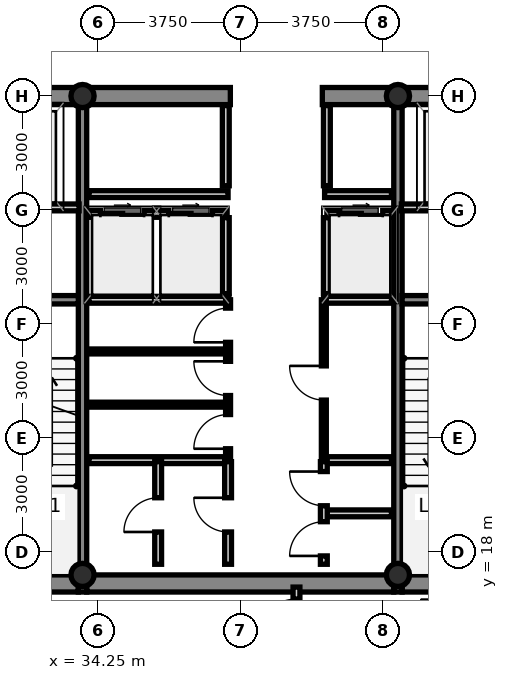
"""IFC4 building model, lengths in metres.
Left out: names, types, materials, properties, quantities, classifications, styles, units other than length and angle.
Written with IfcOpenShell. Run it as: python <this file> out.ifc"""

import sys

from ifc_helpers import new_model, si_unit, direction, frame, frame_2d, origin, origin_2d, place, context, subcontext, project, spatial, rectangle, hollow_circle, extrude, source, transform, mapped, element, fill, save


model = new_model("IFC4")
c1 = context("Model", 3, precision=1e-05, world=origin(), true_north=direction((0.0, 1.0)))
c2 = subcontext(c1, "Body", "Model", "MODEL_VIEW")
j1 = project(units=[si_unit("LENGTHUNIT", "METRE"), si_unit("PLANEANGLEUNIT", "RADIAN")], contexts=[c1])
p1 = place(None, origin())
s1 = spatial("IfcSite", under=j1, at=p1, CompositionType="ELEMENT")
p2 = place(p1, origin())
s2 = spatial("IfcBuilding", under=s1, at=p2, CompositionType="ELEMENT")
p3 = place(p2, frame((0.0, 0.0, 150.05)))
s3 = spatial("IfcBuildingStorey", under=s2, at=p3, CompositionType="ELEMENT", Elevation=150.05)
m1 = source(origin(), c2, "Body", "SweptSolid", [
    extrude(hollow_circle(Radius=0.305, WallThickness=0.025, at=origin_2d()), origin(), (0.0, 0.0, 1.0), 4.8),
])
for number, where, z_axis, x_axis in (
    (1, (33.85, 17.4, 0.0), (0.0, 0.0, 1.0), (1.0, 0.0, 0.0)),
    (2, (42.15, 17.4, 0.0), (0.0, 0.0, 1.0), (1.0, 0.0, 0.0)),
    (3, (33.85, 30.0, 0.0), (0.0, 0.0, 1.0), (1.0, 0.0, 0.0)),
    (4, (42.15, 30.0, 0.0), (0.0, 0.0, 1.0), (1.0, 0.0, 0.0)),
):
    element("IfcColumn", number, at=place(p3, frame(where, z_axis=z_axis, x_axis=x_axis)), inside=s3, PredefinedType="COLUMN", context=c2, shape_type="MappedRepresentation", body=[
        mapped(m1, transform((0.0, 0.0, 0.0), scale=1.0)),
    ])
p4 = place(p3, frame((30.84, 17.175, 0.0), z_axis=(0.0, 0.0, 1.0), x_axis=(1.0, 0.0, 0.0)))
e5 = element("IfcWall", 5, at=p4, inside=s3, PredefinedType="SHEAR", context=c2, shape_type="SweptSolid", body=[
    extrude(rectangle(XDim=2.9, YDim=0.45, at=frame_2d((1.45, 0.0))), origin(), (0.0, 0.0, 1.0), 4.8),
])
p5 = place(p3, frame((33.96, 17.175, 0.0), z_axis=(0.0, 0.0, 1.0), x_axis=(1.0, 0.0, 0.0)))
e6 = element("IfcWall", 6, at=p5, inside=s3, PredefinedType="SHEAR", context=c2, shape_type="SweptSolid", body=[
    extrude(rectangle(XDim=8.08, YDim=0.45, at=frame_2d((4.04, 0.0))), origin(), (0.0, 0.0, 1.0), 4.8),
])
for number, where, z_axis, x_axis in (
    (7, (42.26, 17.175, 0.0), (0.0, 0.0, 1.0), (1.0, 0.0, 0.0)),
    (8, (30.84, 30.0, 0.0), (0.0, 0.0, 1.0), (1.0, 0.0, 0.0)),
):
    element("IfcWall", number, at=place(p3, frame(where, z_axis=z_axis, x_axis=x_axis)), inside=s3, PredefinedType="SHEAR", context=c2, shape_type="SweptSolid", body=[
        extrude(rectangle(XDim=2.9, YDim=0.45, at=frame_2d((1.45, 0.0))), origin(), (0.0, 0.0, 1.0), 4.8),
    ])
p6 = place(p3, frame((33.96, 30.0, 0.0), z_axis=(0.0, 0.0, 1.0), x_axis=(1.0, 0.0, 0.0)))
e9 = element("IfcWall", 9, at=p6, inside=s3, PredefinedType="SHEAR", context=c2, shape_type="SweptSolid", body=[
    extrude(rectangle(XDim=3.78, YDim=0.45, at=frame_2d((1.89, 0.0))), origin(), (0.0, 0.0, 1.0), 4.8),
])
p7 = place(p3, frame((40.16, 30.0, 0.0), z_axis=(0.0, 0.0, 1.0), x_axis=(1.0, 0.0, 0.0)))
e10 = element("IfcWall", 10, at=p7, inside=s3, PredefinedType="SHEAR", context=c2, shape_type="SweptSolid", body=[
    extrude(rectangle(XDim=1.88, YDim=0.45, at=frame_2d((0.94, 0.0))), origin(), (0.0, 0.0, 1.0), 4.8),
])
p8 = place(p3, frame((42.26, 30.0, 0.0), z_axis=(0.0, 0.0, 1.0), x_axis=(1.0, 0.0, 0.0)))
e11 = element("IfcWall", 11, at=p8, inside=s3, PredefinedType="SHEAR", context=c2, shape_type="SweptSolid", body=[
    extrude(rectangle(XDim=2.9, YDim=0.45, at=frame_2d((1.45, 0.0))), origin(), (0.0, 0.0, 1.0), 4.8),
])
for number, where, z_axis, x_axis in (
    (12, (33.85, 16.95, 0.0), (0.0, 0.0, 1.0), (0.0, 1.0, 0.0)),
    (13, (42.15, 16.95, 0.0), (0.0, 0.0, 1.0), (0.0, 1.0, 0.0)),
):
    element("IfcWall", number, at=place(p3, frame(where, z_axis=z_axis, x_axis=x_axis)), inside=s3, PredefinedType="SHEAR", context=c2, shape_type="SweptSolid", body=[
        extrude(rectangle(XDim=13.275, YDim=0.22, at=frame_2d((6.638, 0.0))), origin(), (0.0, 0.0, 1.0), 4.8),
    ])
for number, where, z_axis, x_axis in (
    (14, (30.84, 24.64, 0.0), (0.0, 0.0, 1.0), (1.0, 0.0, 0.0)),
    (15, (42.26, 24.64, 0.0), (0.0, 0.0, 1.0), (1.0, 0.0, 0.0)),
):
    element("IfcWall", number, at=place(p3, frame(where, z_axis=z_axis, x_axis=x_axis)), inside=s3, PredefinedType="SHEAR", context=c2, shape_type="SweptSolid", body=[
        extrude(rectangle(XDim=2.9, YDim=0.22, at=frame_2d((1.45, 0.0))), origin(), (0.0, 0.0, 1.0), 4.8),
    ])
p9 = place(p3, frame((34.02, 26.9, 0.0), z_axis=(0.0, 0.0, 1.0), x_axis=(1.0, 0.0, 0.0)))
e16 = element("IfcWall", 16, at=p9, inside=s3, PredefinedType="PARTITIONING", context=c2, shape_type="SweptSolid", body=[
    extrude(rectangle(XDim=3.6, YDim=0.18, at=frame_2d((1.8, 0.0))), origin(), (0.0, 0.0, 1.0), 4.55),
])
p10 = place(p9, frame((0.3, 0.0, 0.0)))
e17 = element("IfcOpeningElement", 17, at=p10, cuts=e16, PredefinedType="OPENING", context=c2, shape_type="SweptSolid", body=[
    extrude(rectangle(XDim=1.15, YDim=2.2, at=frame_2d((0.575, 1.1))), frame((0.0, 0.102, 0.0), z_axis=(0.0, -1.0, 0.0), x_axis=(1.0, 0.0, 0.0)), (0.0, 0.0, 1.0), 0.204),
])
p11 = place(p9, frame((2.1, 0.0, 0.0)))
e18 = element("IfcOpeningElement", 18, at=p11, cuts=e16, PredefinedType="OPENING", context=c2, shape_type="SweptSolid", body=[
    extrude(rectangle(XDim=1.15, YDim=2.2, at=frame_2d((0.575, 1.1))), frame((0.0, 0.102, 0.0), z_axis=(0.0, -1.0, 0.0), x_axis=(1.0, 0.0, 0.0)), (0.0, 0.0, 1.0), 0.204),
])
p12 = place(p3, frame((40.28, 26.9, 0.0), z_axis=(0.0, 0.0, 1.0), x_axis=(1.0, 0.0, 0.0)))
e19 = element("IfcWall", 19, at=p12, inside=s3, PredefinedType="PARTITIONING", context=c2, shape_type="SweptSolid", body=[
    extrude(rectangle(XDim=1.7, YDim=0.18, at=frame_2d((0.85, 0.0))), origin(), (0.0, 0.0, 1.0), 4.55),
])
p13 = place(p12, frame((0.32, 0.0, 0.0)))
e20 = element("IfcOpeningElement", 20, at=p13, cuts=e19, PredefinedType="OPENING", context=c2, shape_type="SweptSolid", body=[
    extrude(rectangle(XDim=1.15, YDim=2.2, at=frame_2d((0.575, 1.1))), frame((0.0, 0.102, 0.0), z_axis=(0.0, -1.0, 0.0), x_axis=(1.0, 0.0, 0.0)), (0.0, 0.0, 1.0), 0.204),
])
for number, where, z_axis, x_axis in (
    (21, (37.62, 24.8, 0.0), (0.0, 0.0, 1.0), (0.0, 1.0, 0.0)),
    (22, (40.28, 24.8, 0.0), (0.0, 0.0, 1.0), (0.0, 1.0, 0.0)),
):
    element("IfcWall", number, at=place(p3, frame(where, z_axis=z_axis, x_axis=x_axis)), inside=s3, PredefinedType="PARTITIONING", context=c2, shape_type="SweptSolid", body=[
        extrude(rectangle(XDim=2.0, YDim=0.18, at=frame_2d((1.0, 0.0))), origin(), (0.0, 0.0, 1.0), 4.55),
    ])
p14 = place(p3, frame((34.02, 24.64, 0.0), z_axis=(0.0, 0.0, 1.0), x_axis=(1.0, 0.0, 0.0)))
e23 = element("IfcWall", 23, at=p14, inside=s3, PredefinedType="PARTITIONING", context=c2, shape_type="SweptSolid", body=[
    extrude(rectangle(XDim=3.68, YDim=0.18, at=frame_2d((1.84, 0.0))), origin(), (0.0, 0.0, 1.0), 4.55),
])
p15 = place(p3, frame((40.2, 24.64, 0.0), z_axis=(0.0, 0.0, 1.0), x_axis=(1.0, 0.0, 0.0)))
e24 = element("IfcWall", 24, at=p15, inside=s3, PredefinedType="PARTITIONING", context=c2, shape_type="SweptSolid", body=[
    extrude(rectangle(XDim=1.78, YDim=0.18, at=frame_2d((0.89, 0.0))), origin(), (0.0, 0.0, 1.0), 4.55),
])
p16 = place(p3, frame((34.02, 27.42, 0.0), z_axis=(0.0, 0.0, 1.0), x_axis=(1.0, 0.0, 0.0)))
e25 = element("IfcWall", 25, at=p16, inside=s3, PredefinedType="PARTITIONING", context=c2, shape_type="SweptSolid", body=[
    extrude(rectangle(XDim=3.66, YDim=0.18, at=frame_2d((1.83, 0.0))), origin(), (0.0, 0.0, 1.0), 4.55),
])
p17 = place(p3, frame((40.22, 27.42, 0.0), z_axis=(0.0, 0.0, 1.0), x_axis=(1.0, 0.0, 0.0)))
e26 = element("IfcWall", 26, at=p17, inside=s3, PredefinedType="PARTITIONING", context=c2, shape_type="SweptSolid", body=[
    extrude(rectangle(XDim=1.76, YDim=0.18, at=frame_2d((0.88, 0.0))), origin(), (0.0, 0.0, 1.0), 4.55),
])
for number, where, z_axis, x_axis in (
    (27, (37.62, 27.64, 0.0), (0.0, 0.0, 1.0), (0.0, 1.0, 0.0)),
    (28, (40.28, 27.64, 0.0), (0.0, 0.0, 1.0), (0.0, 1.0, 0.0)),
):
    element("IfcWall", number, at=place(p3, frame(where, z_axis=z_axis, x_axis=x_axis)), inside=s3, PredefinedType="PARTITIONING", context=c2, shape_type="SweptSolid", body=[
        extrude(rectangle(XDim=2.11, YDim=0.18, at=frame_2d((1.055, 0.0))), origin(), (0.0, 0.0, 1.0), 4.55),
    ])
for number, where, z_axis, x_axis in (
    (29, (30.86, 27.07, 0.0), (0.0, 0.0, 1.0), (1.0, 0.0, 0.0)),
    (30, (42.24, 27.07, 0.0), (0.0, 0.0, 1.0), (1.0, 0.0, 0.0)),
):
    element("IfcWall", number, at=place(p3, frame(where, z_axis=z_axis, x_axis=x_axis)), inside=s3, PredefinedType="PARTITIONING", context=c2, shape_type="SweptSolid", body=[
        extrude(rectangle(XDim=2.9, YDim=0.18, at=frame_2d((1.45, 0.0))), origin(), (0.0, 0.0, 1.0), 4.55),
    ])
p18 = place(p3, frame((34.02, 20.42, 0.0), z_axis=(0.0, 0.0, 1.0), x_axis=(1.0, 0.0, 0.0)))
e31 = element("IfcWall", 31, at=p18, inside=s3, PredefinedType="PARTITIONING", context=c2, shape_type="SweptSolid", body=[
    extrude(rectangle(XDim=3.64, YDim=0.18, at=frame_2d((1.82, 0.0))), origin(), (0.0, 0.0, 1.0), 4.55),
])
p19 = place(p3, frame((40.22, 20.42, 0.0), z_axis=(0.0, 0.0, 1.0), x_axis=(1.0, 0.0, 0.0)))
e32 = element("IfcWall", 32, at=p19, inside=s3, PredefinedType="PARTITIONING", context=c2, shape_type="SweptSolid", body=[
    extrude(rectangle(XDim=1.76, YDim=0.18, at=frame_2d((0.88, 0.0))), origin(), (0.0, 0.0, 1.0), 4.55),
])
for number, where, z_axis, x_axis in (
    (33, (34.02, 21.88, 0.0), (0.0, 0.0, 1.0), (1.0, 0.0, 0.0)),
    (34, (34.02, 23.28, 0.0), (0.0, 0.0, 1.0), (1.0, 0.0, 0.0)),
):
    element("IfcWall", number, at=place(p3, frame(where, z_axis=z_axis, x_axis=x_axis)), inside=s3, PredefinedType="PARTITIONING", context=c2, shape_type="SweptSolid", body=[
        extrude(rectangle(XDim=3.58, YDim=0.13, at=frame_2d((1.79, 0.0))), origin(), (0.0, 0.0, 1.0), 4.55),
    ])
p20 = place(p3, frame((37.68, 20.5, 0.0), z_axis=(0.0, 0.0, 1.0), x_axis=(0.0, 1.0, 0.0)))
e35 = element("IfcWall", 35, at=p20, inside=s3, PredefinedType="PARTITIONING", context=c2, shape_type="SweptSolid", body=[
    extrude(rectangle(XDim=4.14, YDim=0.13, at=frame_2d((2.07, 0.0))), origin(), (0.0, 0.0, 1.0), 4.55),
])
p21 = place(p20, frame((0.22, 0.0, 0.0)))
e36 = element("IfcOpeningElement", 36, at=p21, cuts=e35, PredefinedType="OPENING", context=c2, shape_type="SweptSolid", body=[
    extrude(rectangle(XDim=0.9, YDim=2.1, at=frame_2d((0.45, 1.05))), frame((0.0, 0.077, 0.0), z_axis=(0.0, -1.0, 0.0), x_axis=(1.0, 0.0, 0.0)), (0.0, 0.0, 1.0), 0.154),
])
p22 = place(p20, frame((1.62, 0.0, 0.0)))
e37 = element("IfcOpeningElement", 37, at=p22, cuts=e35, PredefinedType="OPENING", context=c2, shape_type="SweptSolid", body=[
    extrude(rectangle(XDim=0.9, YDim=2.1, at=frame_2d((0.45, 1.05))), frame((0.0, 0.077, 0.0), z_axis=(0.0, -1.0, 0.0), x_axis=(1.0, 0.0, 0.0)), (0.0, 0.0, 1.0), 0.154),
])
p23 = place(p20, frame((3.02, 0.0, 0.0)))
e38 = element("IfcOpeningElement", 38, at=p23, cuts=e35, PredefinedType="OPENING", context=c2, shape_type="SweptSolid", body=[
    extrude(rectangle(XDim=0.9, YDim=2.1, at=frame_2d((0.45, 1.05))), frame((0.0, 0.077, 0.0), z_axis=(0.0, -1.0, 0.0), x_axis=(1.0, 0.0, 0.0)), (0.0, 0.0, 1.0), 0.154),
])
p24 = place(p3, frame((40.2, 20.5, 0.0), z_axis=(0.0, 0.0, 1.0), x_axis=(0.0, 1.0, 0.0)))
e39 = element("IfcWall", 39, at=p24, inside=s3, PredefinedType="PARTITIONING", context=c2, shape_type="SweptSolid", body=[
    extrude(rectangle(XDim=4.14, YDim=0.13, at=frame_2d((2.07, 0.0))), origin(), (0.0, 0.0, 1.0), 4.55),
])
p25 = place(p24, frame((1.5, 0.0, 0.0)))
e40 = element("IfcOpeningElement", 40, at=p25, cuts=e39, PredefinedType="OPENING", context=c2, shape_type="SweptSolid", body=[
    extrude(rectangle(XDim=0.9, YDim=2.1, at=frame_2d((0.45, 1.05))), frame((0.0, 0.077, 0.0), z_axis=(0.0, -1.0, 0.0), x_axis=(1.0, 0.0, 0.0)), (0.0, 0.0, 1.0), 0.154),
])
p26 = place(p3, frame((35.84, 17.68, 0.0), z_axis=(0.0, 0.0, 1.0), x_axis=(0.0, 1.0, 0.0)))
e41 = element("IfcWall", 41, at=p26, inside=s3, PredefinedType="PARTITIONING", context=c2, shape_type="SweptSolid", body=[
    extrude(rectangle(XDim=2.7, YDim=0.18, at=frame_2d((1.35, 0.0))), origin(), (0.0, 0.0, 1.0), 4.55),
])
p27 = place(p26, frame((0.85, 0.0, 0.0)))
e42 = element("IfcOpeningElement", 42, at=p27, cuts=e41, PredefinedType="OPENING", context=c2, shape_type="SweptSolid", body=[
    extrude(rectangle(XDim=0.9, YDim=2.1, at=frame_2d((0.45, 1.05))), frame((0.0, 0.102, 0.0), z_axis=(0.0, -1.0, 0.0), x_axis=(1.0, 0.0, 0.0)), (0.0, 0.0, 1.0), 0.204),
])
p28 = place(p3, frame((37.68, 17.68, 0.0), z_axis=(0.0, 0.0, 1.0), x_axis=(0.0, 1.0, 0.0)))
e43 = element("IfcWall", 43, at=p28, inside=s3, PredefinedType="PARTITIONING", context=c2, shape_type="SweptSolid", body=[
    extrude(rectangle(XDim=2.7, YDim=0.18, at=frame_2d((1.35, 0.0))), origin(), (0.0, 0.0, 1.0), 4.55),
])
p29 = place(p28, frame((0.85, 0.0, 0.0)))
e44 = element("IfcOpeningElement", 44, at=p29, cuts=e43, PredefinedType="OPENING", context=c2, shape_type="SweptSolid", body=[
    extrude(rectangle(XDim=0.9, YDim=2.1, at=frame_2d((0.45, 1.05))), frame((0.0, 0.102, 0.0), z_axis=(0.0, -1.0, 0.0), x_axis=(1.0, 0.0, 0.0)), (0.0, 0.0, 1.0), 0.204),
])
p30 = place(p3, frame((40.28, 19.02, 0.0), z_axis=(0.0, 0.0, 1.0), x_axis=(1.0, 0.0, 0.0)))
e45 = element("IfcWall", 45, at=p30, inside=s3, PredefinedType="PARTITIONING", context=c2, shape_type="SweptSolid", body=[
    extrude(rectangle(XDim=1.7, YDim=0.18, at=frame_2d((0.85, 0.0))), origin(), (0.0, 0.0, 1.0), 4.55),
])
p31 = place(p3, frame((40.2, 17.68, 0.0), z_axis=(0.0, 0.0, 1.0), x_axis=(0.0, 1.0, 0.0)))
e46 = element("IfcWall", 46, at=p31, inside=s3, PredefinedType="PARTITIONING", context=c2, shape_type="SweptSolid", body=[
    extrude(rectangle(XDim=2.7, YDim=0.18, at=frame_2d((1.35, 0.0))), origin(), (0.0, 0.0, 1.0), 4.55),
])
p32 = place(p31, frame((0.22, 0.0, 0.0)))
e47 = element("IfcOpeningElement", 47, at=p32, cuts=e46, PredefinedType="OPENING", context=c2, shape_type="SweptSolid", body=[
    extrude(rectangle(XDim=0.9, YDim=2.1, at=frame_2d((0.45, 1.05))), frame((0.0, 0.102, 0.0), z_axis=(0.0, -1.0, 0.0), x_axis=(1.0, 0.0, 0.0)), (0.0, 0.0, 1.0), 0.204),
])
p33 = place(p31, frame((1.54, 0.0, 0.0)))
e48 = element("IfcOpeningElement", 48, at=p33, cuts=e46, PredefinedType="OPENING", context=c2, shape_type="SweptSolid", body=[
    extrude(rectangle(XDim=0.9, YDim=2.1, at=frame_2d((0.45, 1.05))), frame((0.0, 0.102, 0.0), z_axis=(0.0, -1.0, 0.0), x_axis=(1.0, 0.0, 0.0)), (0.0, 0.0, 1.0), 0.204),
])
p34 = place(p3, frame((39.48, 15.465, 0.0), z_axis=(0.0, 0.0, 1.0), x_axis=(0.0, 1.0, 0.0)))
e49 = element("IfcWall", 49, at=p34, inside=s3, PredefinedType="PARTITIONING", context=c2, shape_type="SweptSolid", body=[
    extrude(rectangle(XDim=1.615, YDim=0.18, at=frame_2d((0.808, 0.0))), origin(), (0.0, 0.0, 1.0), 4.55),
])
p35 = place(p34, frame((0.25, 0.0, 0.0)))
e50 = element("IfcOpeningElement", 50, at=p35, cuts=e49, PredefinedType="OPENING", context=c2, shape_type="SweptSolid", body=[
    extrude(rectangle(XDim=1.05, YDim=2.15, at=frame_2d((0.525, 1.075))), frame((0.0, 0.102, 0.0), z_axis=(0.0, -1.0, 0.0), x_axis=(1.0, 0.0, 0.0)), (0.0, 0.0, 1.0), 0.204),
])
p36 = place(p10, origin())
e51 = element("IfcDoor", 51, at=p36, inside=s3, OperationType="SLIDING_TO_LEFT", PredefinedType="DOOR", context=c2, shape_type="SweptSolid", body=[
    extrude(rectangle(XDim=1.15, YDim=2.2, at=frame_2d((0.575, 1.1))), frame((0.0, 0.025, 0.0), z_axis=(0.0, -1.0, 0.0), x_axis=(1.0, 0.0, 0.0)), (0.0, 0.0, 1.0), 0.05),
])
fill(e17, e51)
p37 = place(p11, origin())
e52 = element("IfcDoor", 52, at=p37, inside=s3, OperationType="SLIDING_TO_RIGHT", PredefinedType="DOOR", context=c2, shape_type="SweptSolid", body=[
    extrude(rectangle(XDim=1.15, YDim=2.2, at=frame_2d((0.575, 1.1))), frame((0.0, 0.025, 0.0), z_axis=(0.0, -1.0, 0.0), x_axis=(1.0, 0.0, 0.0)), (0.0, 0.0, 1.0), 0.05),
])
fill(e18, e52)
p38 = place(p13, origin())
e53 = element("IfcDoor", 53, at=p38, inside=s3, OperationType="SLIDING_TO_LEFT", PredefinedType="DOOR", context=c2, shape_type="SweptSolid", body=[
    extrude(rectangle(XDim=1.15, YDim=2.2, at=frame_2d((0.575, 1.1))), frame((0.0, 0.025, 0.0), z_axis=(0.0, -1.0, 0.0), x_axis=(1.0, 0.0, 0.0)), (0.0, 0.0, 1.0), 0.05),
])
fill(e20, e53)
p39 = place(p21, origin())
e54 = element("IfcDoor", 54, at=p39, inside=s3, OperationType="SINGLE_SWING_LEFT", PredefinedType="DOOR", context=c2, shape_type="SweptSolid", body=[
    extrude(rectangle(XDim=0.9, YDim=2.1, at=frame_2d((0.45, 1.05))), frame((0.0, 0.025, 0.0), z_axis=(0.0, -1.0, 0.0), x_axis=(1.0, 0.0, 0.0)), (0.0, 0.0, 1.0), 0.05),
])
fill(e36, e54)
p40 = place(p22, origin())
e55 = element("IfcDoor", 55, at=p40, inside=s3, OperationType="SINGLE_SWING_RIGHT", PredefinedType="DOOR", context=c2, shape_type="SweptSolid", body=[
    extrude(rectangle(XDim=0.9, YDim=2.1, at=frame_2d((0.45, 1.05))), frame((0.0, 0.025, 0.0), z_axis=(0.0, -1.0, 0.0), x_axis=(1.0, 0.0, 0.0)), (0.0, 0.0, 1.0), 0.05),
])
fill(e37, e55)
p41 = place(p23, origin())
e56 = element("IfcDoor", 56, at=p41, inside=s3, OperationType="SINGLE_SWING_LEFT", PredefinedType="DOOR", context=c2, shape_type="SweptSolid", body=[
    extrude(rectangle(XDim=0.9, YDim=2.1, at=frame_2d((0.45, 1.05))), frame((0.0, 0.025, 0.0), z_axis=(0.0, -1.0, 0.0), x_axis=(1.0, 0.0, 0.0)), (0.0, 0.0, 1.0), 0.05),
])
fill(e38, e56)
p42 = place(p25, origin())
e57 = element("IfcDoor", 57, at=p42, inside=s3, OperationType="SINGLE_SWING_RIGHT", PredefinedType="DOOR", context=c2, shape_type="SweptSolid", body=[
    extrude(rectangle(XDim=0.9, YDim=2.1, at=frame_2d((0.45, 1.05))), frame((0.0, 0.025, 0.0), z_axis=(0.0, -1.0, 0.0), x_axis=(1.0, 0.0, 0.0)), (0.0, 0.0, 1.0), 0.05),
])
fill(e40, e57)
p43 = place(p27, origin())
e58 = element("IfcDoor", 58, at=p43, inside=s3, OperationType="SINGLE_SWING_LEFT", PredefinedType="DOOR", context=c2, shape_type="SweptSolid", body=[
    extrude(rectangle(XDim=0.9, YDim=2.1, at=frame_2d((0.45, 1.05))), frame((0.0, 0.025, 0.0), z_axis=(0.0, -1.0, 0.0), x_axis=(1.0, 0.0, 0.0)), (0.0, 0.0, 1.0), 0.05),
])
fill(e42, e58)
p44 = place(p29, origin())
e59 = element("IfcDoor", 59, at=p44, inside=s3, OperationType="SINGLE_SWING_RIGHT", PredefinedType="DOOR", context=c2, shape_type="SweptSolid", body=[
    extrude(rectangle(XDim=0.9, YDim=2.1, at=frame_2d((0.45, 1.05))), frame((0.0, 0.025, 0.0), z_axis=(0.0, -1.0, 0.0), x_axis=(1.0, 0.0, 0.0)), (0.0, 0.0, 1.0), 0.05),
])
fill(e44, e59)
p45 = place(p32, origin())
e60 = element("IfcDoor", 60, at=p45, inside=s3, OperationType="SINGLE_SWING_LEFT", PredefinedType="DOOR", context=c2, shape_type="SweptSolid", body=[
    extrude(rectangle(XDim=0.9, YDim=2.1, at=frame_2d((0.45, 1.05))), frame((0.0, 0.025, 0.0), z_axis=(0.0, -1.0, 0.0), x_axis=(1.0, 0.0, 0.0)), (0.0, 0.0, 1.0), 0.05),
])
fill(e47, e60)
p46 = place(p33, origin())
e61 = element("IfcDoor", 61, at=p46, inside=s3, OperationType="SINGLE_SWING_RIGHT", PredefinedType="DOOR", context=c2, shape_type="SweptSolid", body=[
    extrude(rectangle(XDim=0.9, YDim=2.1, at=frame_2d((0.45, 1.05))), frame((0.0, 0.025, 0.0), z_axis=(0.0, -1.0, 0.0), x_axis=(1.0, 0.0, 0.0)), (0.0, 0.0, 1.0), 0.05),
])
fill(e48, e61)
p47 = place(p35, origin())
e62 = element("IfcDoor", 62, at=p47, inside=s3, OperationType="SINGLE_SWING_LEFT", PredefinedType="DOOR", context=c2, shape_type="SweptSolid", body=[
    extrude(rectangle(XDim=1.05, YDim=2.15, at=frame_2d((0.525, 1.075))), frame((0.0, 0.025, 0.0), z_axis=(0.0, -1.0, 0.0), x_axis=(1.0, 0.0, 0.0)), (0.0, 0.0, 1.0), 0.05),
])
fill(e50, e62)
save(model, sys.argv[1])
